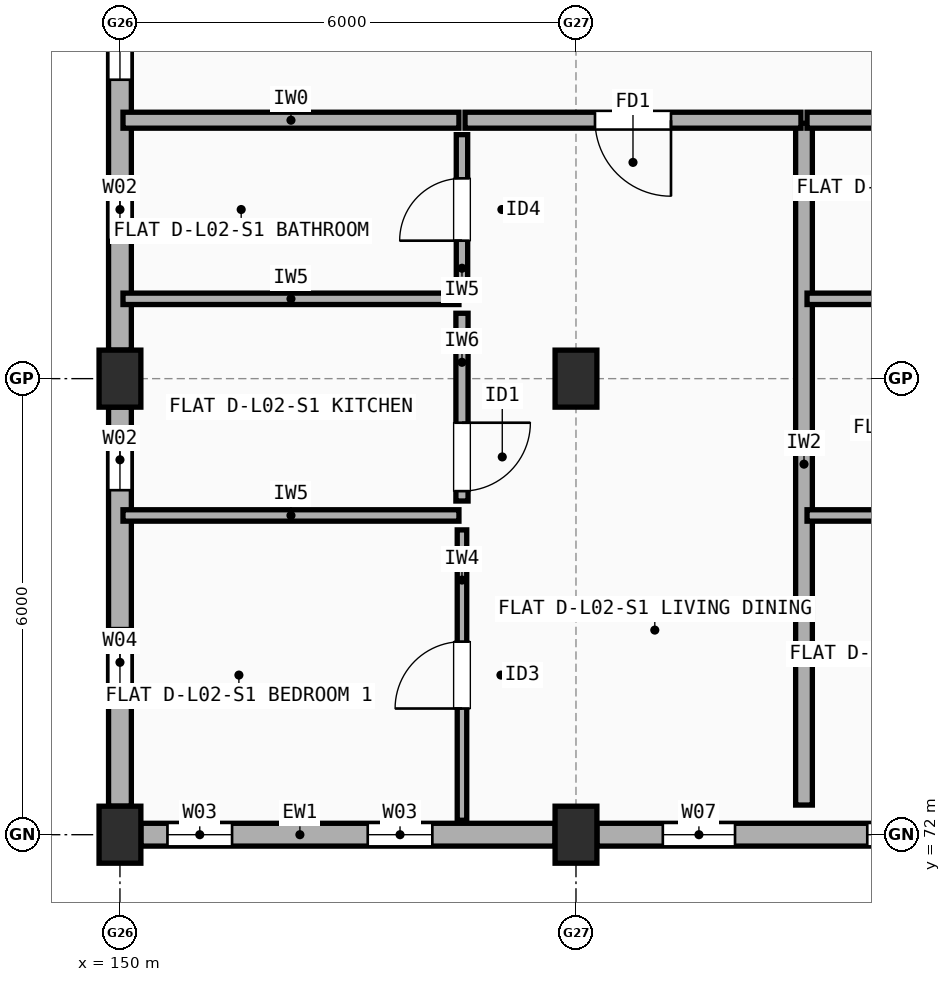
"""IFC4 building model, lengths in metres.
Left out: names, types, materials, properties, quantities, classifications, styles, units other than length and angle.
Written with IfcOpenShell. Run it as: python <this file> out.ifc"""

import sys

from ifc_helpers import new_model, si_unit, direction, frame, frame_2d, origin, origin_2d, place, context, subcontext, project, spatial, rectangle, extrude, element, fill, save


model = new_model("IFC4")
c1 = context("Model", 3, precision=1e-05, world=origin(), true_north=direction((0.0, 1.0)))
c2 = subcontext(c1, "Body", "Model", "MODEL_VIEW")
j1 = project(units=[si_unit("LENGTHUNIT", "METRE"), si_unit("PLANEANGLEUNIT", "RADIAN")], contexts=[c1])
p1 = place(None, origin())
s1 = spatial("IfcSite", under=j1, at=p1, CompositionType="ELEMENT")
p2 = place(p1, origin())
s2 = spatial("IfcBuilding", under=s1, at=p2, CompositionType="ELEMENT")
p3 = place(p2, frame((0.0, 0.0, 7.7)))
s3 = spatial("IfcBuildingStorey", under=s2, at=p3, CompositionType="ELEMENT", Elevation=7.7)
for number, where, z_axis, x_axis in (
    (1, (150.0, 72.0, 0.0), (0.0, 0.0, 1.0), (1.0, 0.0, 0.0)),
    (2, (150.0, 78.0, 0.0), (0.0, 0.0, 1.0), (1.0, 0.0, 0.0)),
    (3, (156.0, 72.0, 0.0), (0.0, 0.0, 1.0), (1.0, 0.0, 0.0)),
    (4, (156.0, 78.0, 0.0), (0.0, 0.0, 1.0), (1.0, 0.0, 0.0)),
):
    element("IfcColumn", number, at=place(p3, frame(where, z_axis=z_axis, x_axis=x_axis)), inside=s3, PredefinedType="COLUMN", context=c2, shape_type="SweptSolid", body=[
        extrude(rectangle(XDim=0.55, YDim=0.75, at=origin_2d()), origin(), (0.0, 0.0, 1.0), 2.955),
    ])
p4 = place(p3, frame((150.275, 72.0, 0.0), z_axis=(0.0, 0.0, 1.0), x_axis=(1.0, 0.0, 0.0)))
e5 = element("IfcWall", 5, at=p4, inside=s3, PredefinedType="STANDARD", context=c2, shape_type="SweptSolid", body=[
    extrude(rectangle(XDim=5.45, YDim=0.3, at=frame_2d((2.725, 0.0))), origin(), (0.0, 0.0, 1.0), 2.437),
])
p5 = place(p4, frame((0.35, 0.0, 0.9)))
e6 = element("IfcOpeningElement", 6, at=p5, cuts=e5, PredefinedType="OPENING", context=c2, shape_type="SweptSolid", body=[
    extrude(rectangle(XDim=0.85, YDim=1.25, at=frame_2d((0.425, 0.625))), frame((0.0, 0.16, 0.0), z_axis=(0.0, -1.0, 0.0), x_axis=(1.0, 0.0, 0.0)), (0.0, 0.0, 1.0), 0.32),
])
p6 = place(p4, frame((2.985, 0.0, 0.9)))
e7 = element("IfcOpeningElement", 7, at=p6, cuts=e5, PredefinedType="OPENING", context=c2, shape_type="SweptSolid", body=[
    extrude(rectangle(XDim=0.85, YDim=1.25, at=frame_2d((0.425, 0.625))), frame((0.0, 0.16, 0.0), z_axis=(0.0, -1.0, 0.0), x_axis=(1.0, 0.0, 0.0)), (0.0, 0.0, 1.0), 0.32),
])
p7 = place(p3, frame((156.275, 72.0, 0.0), z_axis=(0.0, 0.0, 1.0), x_axis=(1.0, 0.0, 0.0)))
e8 = element("IfcWall", 8, at=p7, inside=s3, PredefinedType="STANDARD", context=c2, shape_type="SweptSolid", body=[
    extrude(rectangle(XDim=5.4, YDim=0.3, at=frame_2d((2.7, 0.0))), origin(), (0.0, 0.0, 1.0), 2.437),
])
p8 = place(p7, frame((0.867, 0.0, 0.9)))
e9 = element("IfcOpeningElement", 9, at=p8, cuts=e8, PredefinedType="OPENING", context=c2, shape_type="SweptSolid", body=[
    extrude(rectangle(XDim=0.95, YDim=1.35, at=frame_2d((0.475, 0.675))), frame((0.0, 0.16, 0.0), z_axis=(0.0, -1.0, 0.0), x_axis=(1.0, 0.0, 0.0)), (0.0, 0.0, 1.0), 0.32),
])
p9 = place(p7, frame((3.558, 0.0, 0.9)))
e10 = element("IfcOpeningElement", 10, at=p9, cuts=e8, PredefinedType="OPENING", context=c2, shape_type="SweptSolid", body=[
    extrude(rectangle(XDim=1.05, YDim=1.35, at=frame_2d((0.525, 0.675))), frame((0.0, 0.16, 0.0), z_axis=(0.0, -1.0, 0.0), x_axis=(1.0, 0.0, 0.0)), (0.0, 0.0, 1.0), 0.32),
])
p10 = place(p3, frame((150.0, 83.625, 0.0), z_axis=(0.0, 0.0, 1.0), x_axis=(0.0, -1.0, 0.0)))
e11 = element("IfcWall", 11, at=p10, inside=s3, PredefinedType="STANDARD", context=c2, shape_type="SweptSolid", body=[
    extrude(rectangle(XDim=5.25, YDim=0.3, at=frame_2d((2.625, 0.0))), origin(), (0.0, 0.0, 1.0), 2.437),
])
p11 = place(p10, frame((0.492, 0.0, 0.9)))
e12 = element("IfcOpeningElement", 12, at=p11, cuts=e11, PredefinedType="OPENING", context=c2, shape_type="SweptSolid", body=[
    extrude(rectangle(XDim=1.2, YDim=1.35, at=frame_2d((0.6, 0.675))), frame((0.0, 0.16, 0.0), z_axis=(0.0, -1.0, 0.0), x_axis=(1.0, 0.0, 0.0)), (0.0, 0.0, 1.0), 0.32),
])
p12 = place(p10, frame((3.0, 0.0, 0.9)))
e13 = element("IfcOpeningElement", 13, at=p12, cuts=e11, PredefinedType="OPENING", context=c2, shape_type="SweptSolid", body=[
    extrude(rectangle(XDim=0.8, YDim=1.2, at=frame_2d((0.4, 0.6))), frame((0.0, 0.16, 0.0), z_axis=(0.0, -1.0, 0.0), x_axis=(1.0, 0.0, 0.0)), (0.0, 0.0, 1.0), 0.32),
])
p13 = place(p3, frame((150.0, 77.625, 0.0), z_axis=(0.0, 0.0, 1.0), x_axis=(0.0, -1.0, 0.0)))
e14 = element("IfcWall", 14, at=p13, inside=s3, PredefinedType="STANDARD", context=c2, shape_type="SweptSolid", body=[
    extrude(rectangle(XDim=5.25, YDim=0.3, at=frame_2d((2.625, 0.0))), origin(), (0.0, 0.0, 1.0), 2.437),
])
p14 = place(p13, frame((0.292, 0.0, 0.9)))
e15 = element("IfcOpeningElement", 15, at=p14, cuts=e14, PredefinedType="OPENING", context=c2, shape_type="SweptSolid", body=[
    extrude(rectangle(XDim=0.8, YDim=1.2, at=frame_2d((0.4, 0.6))), frame((0.0, 0.16, 0.0), z_axis=(0.0, -1.0, 0.0), x_axis=(1.0, 0.0, 0.0)), (0.0, 0.0, 1.0), 0.32),
])
p15 = place(p13, frame((2.907, 0.0, 0.9)))
e16 = element("IfcOpeningElement", 16, at=p15, cuts=e14, PredefinedType="OPENING", context=c2, shape_type="SweptSolid", body=[
    extrude(rectangle(XDim=0.9, YDim=1.3, at=frame_2d((0.45, 0.65))), frame((0.0, 0.16, 0.0), z_axis=(0.0, -1.0, 0.0), x_axis=(1.0, 0.0, 0.0)), (0.0, 0.0, 1.0), 0.32),
])
p16 = place(p3, frame((159.0, 72.39, 0.0), z_axis=(0.0, 0.0, 1.0), x_axis=(0.0, 1.0, 0.0)))
e17 = element("IfcWall", 17, at=p16, inside=s3, PredefinedType="SOLIDWALL", context=c2, shape_type="SweptSolid", body=[
    extrude(rectangle(XDim=8.97, YDim=0.22, at=frame_2d((4.485, 0.0))), origin(), (0.0, 0.0, 1.0), 2.437),
])
p17 = place(p3, frame((150.04, 81.4, 0.0), z_axis=(0.0, 0.0, 1.0), x_axis=(1.0, 0.0, 0.0)))
e18 = element("IfcWall", 18, at=p17, inside=s3, PredefinedType="SOLIDWALL", context=c2, shape_type="SweptSolid", body=[
    extrude(rectangle(XDim=4.42, YDim=0.21, at=frame_2d((2.21, 0.0))), origin(), (0.0, 0.0, 1.0), 2.437),
])
p18 = place(p3, frame((154.54, 81.4, 0.0), z_axis=(0.0, 0.0, 1.0), x_axis=(1.0, 0.0, 0.0)))
e19 = element("IfcWall", 19, at=p18, inside=s3, PredefinedType="SOLIDWALL", context=c2, shape_type="SweptSolid", body=[
    extrude(rectangle(XDim=4.42, YDim=0.21, at=frame_2d((2.21, 0.0))), origin(), (0.0, 0.0, 1.0), 2.437),
])
p19 = place(p18, frame((1.71, 0.0, 0.0)))
e20 = element("IfcOpeningElement", 20, at=p19, cuts=e19, PredefinedType="OPENING", context=c2, shape_type="SweptSolid", body=[
    extrude(rectangle(XDim=1.0, YDim=2.15, at=frame_2d((0.5, 1.075))), frame((0.0, 0.115, 0.0), z_axis=(0.0, -1.0, 0.0), x_axis=(1.0, 0.0, 0.0)), (0.0, 0.0, 1.0), 0.23),
])
p20 = place(p3, frame((154.5, 72.19, 0.0), z_axis=(0.0, 0.0, 1.0), x_axis=(0.0, 1.0, 0.0)))
e21 = element("IfcWall", 21, at=p20, inside=s3, PredefinedType="PARTITIONING", context=c2, shape_type="SweptSolid", body=[
    extrude(rectangle(XDim=3.82, YDim=0.125, at=frame_2d((1.91, 0.0))), origin(), (0.0, 0.0, 1.0), 2.955),
])
p21 = place(p20, frame((1.47, 0.0, 0.0)))
e22 = element("IfcOpeningElement", 22, at=p21, cuts=e21, PredefinedType="OPENING", context=c2, shape_type="SweptSolid", body=[
    extrude(rectangle(XDim=0.88, YDim=2.1, at=frame_2d((0.44, 1.05))), frame((0.0, 0.073, 0.0), z_axis=(0.0, -1.0, 0.0), x_axis=(1.0, 0.0, 0.0)), (0.0, 0.0, 1.0), 0.145),
])
p22 = place(p3, frame((154.5, 76.39, 0.0), z_axis=(0.0, 0.0, 1.0), x_axis=(0.0, 1.0, 0.0)))
e23 = element("IfcWall", 23, at=p22, inside=s3, PredefinedType="PLUMBINGWALL", context=c2, shape_type="SweptSolid", body=[
    extrude(rectangle(XDim=2.47, YDim=0.16, at=frame_2d((1.235, 0.0))), origin(), (0.0, 0.0, 1.0), 2.437),
])
p23 = place(p22, frame((0.13, 0.0, 0.0)))
e24 = element("IfcOpeningElement", 24, at=p23, cuts=e23, PredefinedType="OPENING", context=c2, shape_type="SweptSolid", body=[
    extrude(rectangle(XDim=0.9, YDim=2.1, at=frame_2d((0.45, 1.05))), frame((0.0, 0.09, 0.0), z_axis=(0.0, -1.0, 0.0), x_axis=(1.0, 0.0, 0.0)), (0.0, 0.0, 1.0), 0.18),
])
p24 = place(p3, frame((154.5, 79.24, 0.0), z_axis=(0.0, 0.0, 1.0), x_axis=(0.0, 1.0, 0.0)))
e25 = element("IfcWall", 25, at=p24, inside=s3, PredefinedType="PARTITIONING", context=c2, shape_type="SweptSolid", body=[
    extrude(rectangle(XDim=1.97, YDim=0.15, at=frame_2d((0.985, 0.0))), origin(), (0.0, 0.0, 1.0), 2.955),
])
p25 = place(p24, frame((0.575, 0.0, 0.0)))
e26 = element("IfcOpeningElement", 26, at=p25, cuts=e25, PredefinedType="OPENING", context=c2, shape_type="SweptSolid", body=[
    extrude(rectangle(XDim=0.82, YDim=2.08, at=frame_2d((0.41, 1.04))), frame((0.0, 0.085, 0.0), z_axis=(0.0, -1.0, 0.0), x_axis=(1.0, 0.0, 0.0)), (0.0, 0.0, 1.0), 0.17),
])
for number, where, z_axis, x_axis in (
    (27, (150.04, 76.2, 0.0), (0.0, 0.0, 1.0), (1.0, 0.0, 0.0)),
    (28, (150.04, 79.05, 0.0), (0.0, 0.0, 1.0), (1.0, 0.0, 0.0)),
):
    element("IfcWall", number, at=place(p3, frame(where, z_axis=z_axis, x_axis=x_axis)), inside=s3, PredefinedType="PARTITIONING", context=c2, shape_type="SweptSolid", body=[
        extrude(rectangle(XDim=4.42, YDim=0.15, at=frame_2d((2.21, 0.0))), origin(), (0.0, 0.0, 1.0), 2.437),
    ])
p26 = place(p3, frame((159.04, 81.4, 0.0), z_axis=(0.0, 0.0, 1.0), x_axis=(1.0, 0.0, 0.0)))
e29 = element("IfcWall", 29, at=p26, inside=s3, PredefinedType="SOLIDWALL", context=c2, shape_type="SweptSolid", body=[
    extrude(rectangle(XDim=4.42, YDim=0.21, at=frame_2d((2.21, 0.0))), origin(), (0.0, 0.0, 1.0), 2.337),
])
for number, where, z_axis, x_axis in (
    (30, (159.04, 76.2, 0.0), (0.0, 0.0, 1.0), (1.0, 0.0, 0.0)),
    (31, (159.04, 79.05, 0.0), (0.0, 0.0, 1.0), (1.0, 0.0, 0.0)),
):
    element("IfcWall", number, at=place(p3, frame(where, z_axis=z_axis, x_axis=x_axis)), inside=s3, PredefinedType="PARTITIONING", context=c2, shape_type="SweptSolid", body=[
        extrude(rectangle(XDim=4.42, YDim=0.15, at=frame_2d((2.21, 0.0))), origin(), (0.0, 0.0, 1.0), 2.337),
    ])
p27 = place(p5, origin())
e32 = element("IfcWindow", 32, at=p27, inside=s3, PartitioningType="SINGLE_PANEL", PredefinedType="WINDOW", context=c2, shape_type="SweptSolid", body=[
    extrude(rectangle(XDim=0.85, YDim=1.25, at=frame_2d((0.425, 0.625))), frame((0.0, 0.03, 0.0), z_axis=(0.0, -1.0, 0.0), x_axis=(1.0, 0.0, 0.0)), (0.0, 0.0, 1.0), 0.06),
])
fill(e6, e32)
p28 = place(p6, origin())
e33 = element("IfcWindow", 33, at=p28, inside=s3, PartitioningType="SINGLE_PANEL", PredefinedType="WINDOW", context=c2, shape_type="SweptSolid", body=[
    extrude(rectangle(XDim=0.85, YDim=1.25, at=frame_2d((0.425, 0.625))), frame((0.0, 0.03, 0.0), z_axis=(0.0, -1.0, 0.0), x_axis=(1.0, 0.0, 0.0)), (0.0, 0.0, 1.0), 0.06),
])
fill(e7, e33)
p29 = place(p8, origin())
e34 = element("IfcWindow", 34, at=p29, inside=s3, PartitioningType="SINGLE_PANEL", PredefinedType="WINDOW", context=c2, shape_type="SweptSolid", body=[
    extrude(rectangle(XDim=0.95, YDim=1.35, at=frame_2d((0.475, 0.675))), frame((0.0, 0.03, 0.0), z_axis=(0.0, -1.0, 0.0), x_axis=(1.0, 0.0, 0.0)), (0.0, 0.0, 1.0), 0.06),
])
fill(e9, e34)
p30 = place(p9, origin())
e35 = element("IfcWindow", 35, at=p30, inside=s3, PartitioningType="SINGLE_PANEL", PredefinedType="WINDOW", context=c2, shape_type="SweptSolid", body=[
    extrude(rectangle(XDim=1.05, YDim=1.35, at=frame_2d((0.525, 0.675))), frame((0.0, 0.03, 0.0), z_axis=(0.0, -1.0, 0.0), x_axis=(1.0, 0.0, 0.0)), (0.0, 0.0, 1.0), 0.06),
])
fill(e10, e35)
p31 = place(p11, origin())
e36 = element("IfcWindow", 36, at=p31, inside=s3, PartitioningType="SINGLE_PANEL", PredefinedType="WINDOW", context=c2, shape_type="SweptSolid", body=[
    extrude(rectangle(XDim=1.2, YDim=1.35, at=frame_2d((0.6, 0.675))), frame((0.0, 0.03, 0.0), z_axis=(0.0, -1.0, 0.0), x_axis=(1.0, 0.0, 0.0)), (0.0, 0.0, 1.0), 0.06),
])
fill(e12, e36)
p32 = place(p12, origin())
e37 = element("IfcWindow", 37, at=p32, inside=s3, PartitioningType="SINGLE_PANEL", PredefinedType="WINDOW", context=c2, shape_type="SweptSolid", body=[
    extrude(rectangle(XDim=0.8, YDim=1.2, at=frame_2d((0.4, 0.6))), frame((0.0, 0.03, 0.0), z_axis=(0.0, -1.0, 0.0), x_axis=(1.0, 0.0, 0.0)), (0.0, 0.0, 1.0), 0.06),
])
fill(e13, e37)
p33 = place(p14, origin())
e38 = element("IfcWindow", 38, at=p33, inside=s3, PartitioningType="SINGLE_PANEL", PredefinedType="WINDOW", context=c2, shape_type="SweptSolid", body=[
    extrude(rectangle(XDim=0.8, YDim=1.2, at=frame_2d((0.4, 0.6))), frame((0.0, 0.03, 0.0), z_axis=(0.0, -1.0, 0.0), x_axis=(1.0, 0.0, 0.0)), (0.0, 0.0, 1.0), 0.06),
])
fill(e15, e38)
p34 = place(p15, origin())
e39 = element("IfcWindow", 39, at=p34, inside=s3, PartitioningType="SINGLE_PANEL", PredefinedType="WINDOW", context=c2, shape_type="SweptSolid", body=[
    extrude(rectangle(XDim=0.9, YDim=1.3, at=frame_2d((0.45, 0.65))), frame((0.0, 0.03, 0.0), z_axis=(0.0, -1.0, 0.0), x_axis=(1.0, 0.0, 0.0)), (0.0, 0.0, 1.0), 0.06),
])
fill(e16, e39)
p35 = place(p19, origin())
e40 = element("IfcDoor", 40, at=p35, inside=s3, OperationType="SINGLE_SWING_RIGHT", PredefinedType="DOOR", context=c2, shape_type="SweptSolid", body=[
    extrude(rectangle(XDim=1.0, YDim=2.15, at=frame_2d((0.5, 1.075))), frame((0.0, 0.025, 0.0), z_axis=(0.0, -1.0, 0.0), x_axis=(1.0, 0.0, 0.0)), (0.0, 0.0, 1.0), 0.05),
])
fill(e20, e40)
p36 = place(p21, origin())
e41 = element("IfcDoor", 41, at=p36, inside=s3, OperationType="SINGLE_SWING_LEFT", PredefinedType="DOOR", context=c2, shape_type="SweptSolid", body=[
    extrude(rectangle(XDim=0.88, YDim=2.1, at=frame_2d((0.44, 1.05))), frame((0.0, 0.025, 0.0), z_axis=(0.0, -1.0, 0.0), x_axis=(1.0, 0.0, 0.0)), (0.0, 0.0, 1.0), 0.05),
])
fill(e22, e41)
p37 = place(p23, origin())
e42 = element("IfcDoor", 42, at=p37, inside=s3, OperationType="SINGLE_SWING_RIGHT", PredefinedType="DOOR", context=c2, shape_type="SweptSolid", body=[
    extrude(rectangle(XDim=0.9, YDim=2.1, at=frame_2d((0.45, 1.05))), frame((0.0, 0.025, 0.0), z_axis=(0.0, -1.0, 0.0), x_axis=(1.0, 0.0, 0.0)), (0.0, 0.0, 1.0), 0.05),
])
fill(e24, e42)
p38 = place(p25, origin())
e43 = element("IfcDoor", 43, at=p38, inside=s3, OperationType="SINGLE_SWING_LEFT", PredefinedType="DOOR", context=c2, shape_type="SweptSolid", body=[
    extrude(rectangle(XDim=0.82, YDim=2.08, at=frame_2d((0.41, 1.04))), frame((0.0, 0.025, 0.0), z_axis=(0.0, -1.0, 0.0), x_axis=(1.0, 0.0, 0.0)), (0.0, 0.0, 1.0), 0.05),
])
fill(e26, e43)
save(model, sys.argv[1])
